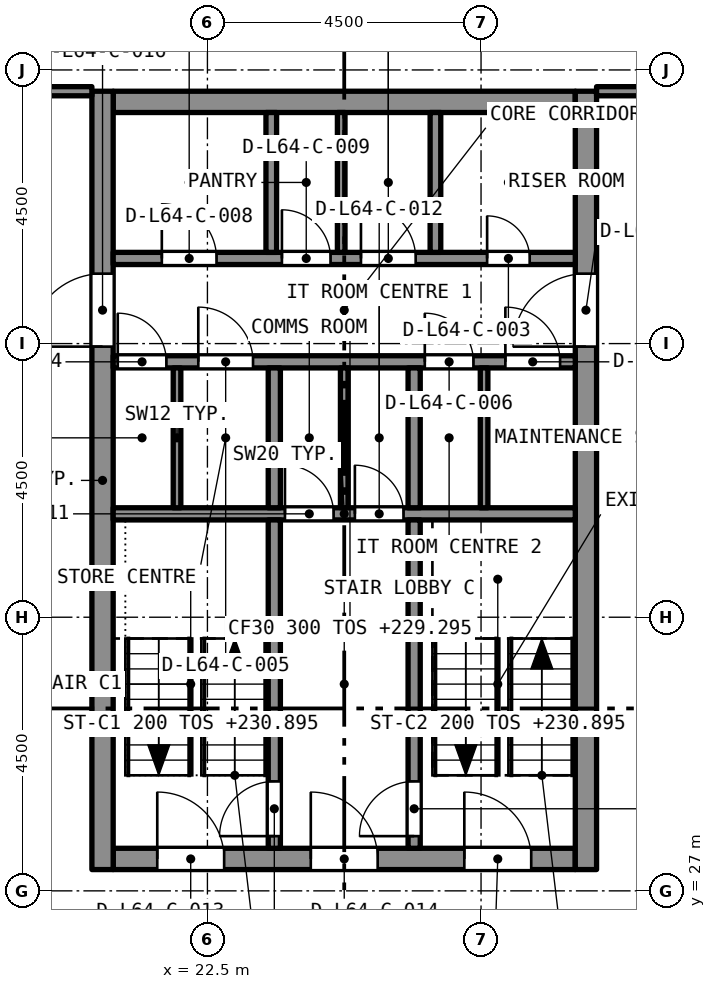
"""IFC4 building model, lengths in metres.
Left out: names, types, materials, properties, quantities, classifications, styles, units other than length and angle.
Written with IfcOpenShell. Run it as: python <this file> out.ifc"""

import sys

from ifc_helpers import new_model, si_unit, direction, frame, frame_2d, origin, place, context, subcontext, project, spatial, rectangle, extrude, element, fill, save


model = new_model("IFC4")
c1 = context("Model", 3, precision=1e-05, world=origin(), true_north=direction((0.0, 1.0)))
c2 = subcontext(c1, "Body", "Model", "MODEL_VIEW")
j1 = project(units=[si_unit("LENGTHUNIT", "METRE"), si_unit("PLANEANGLEUNIT", "RADIAN")], contexts=[c1])
p1 = place(None, origin())
s1 = spatial("IfcSite", under=j1, at=p1, CompositionType="ELEMENT")
p2 = place(p1, origin())
s2 = spatial("IfcBuilding", under=s1, at=p2, CompositionType="ELEMENT")
p3 = place(p2, frame((0.0, 0.0, 229.295)))
s3 = spatial("IfcBuildingStorey", under=s2, at=p3, CompositionType="ELEMENT", Elevation=229.295)
p4 = place(p3, frame((20.95, 27.525, 0.0), z_axis=(0.0, 0.0, 1.0), x_axis=(1.0, 0.0, 0.0)))
e1 = element("IfcWall", 1, at=p4, inside=s3, PredefinedType="SOLIDWALL", context=c2, shape_type="SweptSolid", body=[
    extrude(rectangle(XDim=7.6, YDim=0.35, at=frame_2d((3.8, 0.0))), origin(), (0.0, 0.0, 1.0), 3.2),
])
p5 = place(p4, frame((0.725, 0.0, 0.0)))
e2 = element("IfcOpeningElement", 2, at=p5, cuts=e1, PredefinedType="OPENING", context=c2, shape_type="SweptSolid", body=[
    extrude(rectangle(XDim=1.1, YDim=2.1, at=frame_2d((0.55, 1.05))), frame((0.0, 0.185, 0.0), z_axis=(0.0, -1.0, 0.0), x_axis=(1.0, 0.0, 0.0)), (0.0, 0.0, 1.0), 0.37),
])
p6 = place(p4, frame((3.25, 0.0, 0.0)))
e3 = element("IfcOpeningElement", 3, at=p6, cuts=e1, PredefinedType="OPENING", context=c2, shape_type="SweptSolid", body=[
    extrude(rectangle(XDim=1.1, YDim=2.1, at=frame_2d((0.55, 1.05))), frame((0.0, 0.185, 0.0), z_axis=(0.0, -1.0, 0.0), x_axis=(1.0, 0.0, 0.0)), (0.0, 0.0, 1.0), 0.37),
])
p7 = place(p4, frame((5.775, 0.0, 0.0)))
e4 = element("IfcOpeningElement", 4, at=p7, cuts=e1, PredefinedType="OPENING", context=c2, shape_type="SweptSolid", body=[
    extrude(rectangle(XDim=1.1, YDim=2.1, at=frame_2d((0.55, 1.05))), frame((0.0, 0.185, 0.0), z_axis=(0.0, -1.0, 0.0), x_axis=(1.0, 0.0, 0.0)), (0.0, 0.0, 1.0), 0.37),
])
p8 = place(p3, frame((20.95, 39.975, 0.0), z_axis=(0.0, 0.0, 1.0), x_axis=(1.0, 0.0, 0.0)))
e5 = element("IfcWall", 5, at=p8, inside=s3, PredefinedType="SOLIDWALL", context=c2, shape_type="SweptSolid", body=[
    extrude(rectangle(XDim=7.6, YDim=0.35, at=frame_2d((3.8, 0.0))), origin(), (0.0, 0.0, 1.0), 3.2),
])
p9 = place(p3, frame((20.775, 27.35, 0.0), z_axis=(0.0, 0.0, 1.0), x_axis=(0.0, 1.0, 0.0)))
e6 = element("IfcWall", 6, at=p9, inside=s3, PredefinedType="SOLIDWALL", context=c2, shape_type="SweptSolid", body=[
    extrude(rectangle(XDim=12.8, YDim=0.35, at=frame_2d((6.4, 0.0))), origin(), (0.0, 0.0, 1.0), 3.2),
])
p10 = place(p9, frame((8.6, 0.0, 0.0)))
e7 = element("IfcOpeningElement", 7, at=p10, cuts=e6, PredefinedType="OPENING", context=c2, shape_type="SweptSolid", body=[
    extrude(rectangle(XDim=1.2, YDim=2.1, at=frame_2d((0.6, 1.05))), frame((0.0, 0.185, 0.0), z_axis=(0.0, -1.0, 0.0), x_axis=(1.0, 0.0, 0.0)), (0.0, 0.0, 1.0), 0.37),
])
p11 = place(p3, frame((28.725, 27.35, 0.0), z_axis=(0.0, 0.0, 1.0), x_axis=(0.0, 1.0, 0.0)))
e8 = element("IfcWall", 8, at=p11, inside=s3, PredefinedType="SOLIDWALL", context=c2, shape_type="SweptSolid", body=[
    extrude(rectangle(XDim=12.8, YDim=0.35, at=frame_2d((6.4, 0.0))), origin(), (0.0, 0.0, 1.0), 3.2),
])
p12 = place(p11, frame((8.6, 0.0, 0.0)))
e9 = element("IfcOpeningElement", 9, at=p12, cuts=e8, PredefinedType="OPENING", context=c2, shape_type="SweptSolid", body=[
    extrude(rectangle(XDim=1.2, YDim=2.1, at=frame_2d((0.6, 1.05))), frame((0.0, 0.185, 0.0), z_axis=(0.0, -1.0, 0.0), x_axis=(1.0, 0.0, 0.0)), (0.0, 0.0, 1.0), 0.37),
])
p13 = place(p3, frame((18.4, 40.15, 0.0), z_axis=(0.0, 0.0, 1.0), x_axis=(1.0, 0.0, 0.0)))
e10 = element("IfcWall", 10, at=p13, inside=s3, PredefinedType="PARTITIONING", context=c2, shape_type="SweptSolid", body=[
    extrude(rectangle(XDim=2.2, YDim=0.15, at=frame_2d((1.1, 0.0))), origin(), (0.0, 0.0, 1.0), 2.75),
])
p14 = place(p13, frame((0.2, 0.0, 0.0)))
e11 = element("IfcOpeningElement", 11, at=p14, cuts=e10, PredefinedType="OPENING", context=c2, shape_type="SweptSolid", body=[
    extrude(rectangle(XDim=1.0, YDim=2.1, at=frame_2d((0.5, 1.05))), frame((0.0, 0.085, 0.0), z_axis=(0.0, -1.0, 0.0), x_axis=(1.0, 0.0, 0.0)), (0.0, 0.0, 1.0), 0.17),
])
p15 = place(p3, frame((28.9, 40.15, 0.0), z_axis=(0.0, 0.0, 1.0), x_axis=(1.0, 0.0, 0.0)))
e12 = element("IfcWall", 12, at=p15, inside=s3, PredefinedType="PARTITIONING", context=c2, shape_type="SweptSolid", body=[
    extrude(rectangle(XDim=2.2, YDim=0.15, at=frame_2d((1.1, 0.0))), origin(), (0.0, 0.0, 1.0), 2.75),
])
p16 = place(p3, frame((20.95, 33.2, 0.0), z_axis=(0.0, 0.0, 1.0), x_axis=(1.0, 0.0, 0.0)))
e13 = element("IfcWall", 13, at=p16, inside=s3, PredefinedType="SOLIDWALL", context=c2, shape_type="SweptSolid", body=[
    extrude(rectangle(XDim=7.6, YDim=0.2, at=frame_2d((3.8, 0.0))), origin(), (0.0, 0.0, 1.0), 2.9),
])
p17 = place(p16, frame((2.825, 0.0, 0.0)))
e14 = element("IfcOpeningElement", 14, at=p17, cuts=e13, PredefinedType="OPENING", context=c2, shape_type="SweptSolid", body=[
    extrude(rectangle(XDim=0.8, YDim=2.1, at=frame_2d((0.4, 1.05))), frame((0.0, 0.11, 0.0), z_axis=(0.0, -1.0, 0.0), x_axis=(1.0, 0.0, 0.0)), (0.0, 0.0, 1.0), 0.22),
])
p18 = place(p16, frame((3.975, 0.0, 0.0)))
e15 = element("IfcOpeningElement", 15, at=p18, cuts=e13, PredefinedType="OPENING", context=c2, shape_type="SweptSolid", body=[
    extrude(rectangle(XDim=0.8, YDim=2.1, at=frame_2d((0.4, 1.05))), frame((0.0, 0.11, 0.0), z_axis=(0.0, -1.0, 0.0), x_axis=(1.0, 0.0, 0.0)), (0.0, 0.0, 1.0), 0.22),
])
p19 = place(p3, frame((20.95, 35.7, 0.0), z_axis=(0.0, 0.0, 1.0), x_axis=(1.0, 0.0, 0.0)))
e16 = element("IfcWall", 16, at=p19, inside=s3, PredefinedType="SOLIDWALL", context=c2, shape_type="SweptSolid", body=[
    extrude(rectangle(XDim=7.6, YDim=0.2, at=frame_2d((3.8, 0.0))), origin(), (0.0, 0.0, 1.0), 2.9),
])
p20 = place(p19, frame((0.075, 0.0, 0.0)))
e17 = element("IfcOpeningElement", 17, at=p20, cuts=e16, PredefinedType="OPENING", context=c2, shape_type="SweptSolid", body=[
    extrude(rectangle(XDim=0.8, YDim=2.1, at=frame_2d((0.4, 1.05))), frame((0.0, 0.11, 0.0), z_axis=(0.0, -1.0, 0.0), x_axis=(1.0, 0.0, 0.0)), (0.0, 0.0, 1.0), 0.22),
])
p21 = place(p19, frame((1.4, 0.0, 0.0)))
e18 = element("IfcOpeningElement", 18, at=p21, cuts=e16, PredefinedType="OPENING", context=c2, shape_type="SweptSolid", body=[
    extrude(rectangle(XDim=0.9, YDim=2.1, at=frame_2d((0.45, 1.05))), frame((0.0, 0.11, 0.0), z_axis=(0.0, -1.0, 0.0), x_axis=(1.0, 0.0, 0.0)), (0.0, 0.0, 1.0), 0.22),
])
p22 = place(p19, frame((5.125, 0.0, 0.0)))
e19 = element("IfcOpeningElement", 19, at=p22, cuts=e16, PredefinedType="OPENING", context=c2, shape_type="SweptSolid", body=[
    extrude(rectangle(XDim=0.8, YDim=2.1, at=frame_2d((0.4, 1.05))), frame((0.0, 0.11, 0.0), z_axis=(0.0, -1.0, 0.0), x_axis=(1.0, 0.0, 0.0)), (0.0, 0.0, 1.0), 0.22),
])
p23 = place(p19, frame((6.45, 0.0, 0.0)))
e20 = element("IfcOpeningElement", 20, at=p23, cuts=e16, PredefinedType="OPENING", context=c2, shape_type="SweptSolid", body=[
    extrude(rectangle(XDim=0.9, YDim=2.1, at=frame_2d((0.45, 1.05))), frame((0.0, 0.11, 0.0), z_axis=(0.0, -1.0, 0.0), x_axis=(1.0, 0.0, 0.0)), (0.0, 0.0, 1.0), 0.22),
])
p24 = place(p3, frame((20.95, 37.4, 0.0), z_axis=(0.0, 0.0, 1.0), x_axis=(1.0, 0.0, 0.0)))
e21 = element("IfcWall", 21, at=p24, inside=s3, PredefinedType="SOLIDWALL", context=c2, shape_type="SweptSolid", body=[
    extrude(rectangle(XDim=7.6, YDim=0.2, at=frame_2d((3.8, 0.0))), origin(), (0.0, 0.0, 1.0), 2.9),
])
p25 = place(p24, frame((6.15, 0.0, 0.0)))
e22 = element("IfcOpeningElement", 22, at=p25, cuts=e21, PredefinedType="OPENING", context=c2, shape_type="SweptSolid", body=[
    extrude(rectangle(XDim=0.7, YDim=2.1, at=frame_2d((0.35, 1.05))), frame((0.0, 0.11, 0.0), z_axis=(0.0, -1.0, 0.0), x_axis=(1.0, 0.0, 0.0)), (0.0, 0.0, 1.0), 0.22),
])
p26 = place(p24, frame((0.8, 0.0, 0.0)))
e23 = element("IfcOpeningElement", 23, at=p26, cuts=e21, PredefinedType="OPENING", context=c2, shape_type="SweptSolid", body=[
    extrude(rectangle(XDim=0.9, YDim=2.1, at=frame_2d((0.45, 1.05))), frame((0.0, 0.11, 0.0), z_axis=(0.0, -1.0, 0.0), x_axis=(1.0, 0.0, 0.0)), (0.0, 0.0, 1.0), 0.22),
])
p27 = place(p24, frame((2.775, 0.0, 0.0)))
e24 = element("IfcOpeningElement", 24, at=p27, cuts=e21, PredefinedType="OPENING", context=c2, shape_type="SweptSolid", body=[
    extrude(rectangle(XDim=0.8, YDim=2.1, at=frame_2d((0.4, 1.05))), frame((0.0, 0.11, 0.0), z_axis=(0.0, -1.0, 0.0), x_axis=(1.0, 0.0, 0.0)), (0.0, 0.0, 1.0), 0.22),
])
p28 = place(p24, frame((4.075, 0.0, 0.0)))
e25 = element("IfcOpeningElement", 25, at=p28, cuts=e21, PredefinedType="OPENING", context=c2, shape_type="SweptSolid", body=[
    extrude(rectangle(XDim=0.9, YDim=2.1, at=frame_2d((0.45, 1.05))), frame((0.0, 0.11, 0.0), z_axis=(0.0, -1.0, 0.0), x_axis=(1.0, 0.0, 0.0)), (0.0, 0.0, 1.0), 0.22),
])
p29 = place(p3, frame((23.6, 27.7, 0.0), z_axis=(0.0, 0.0, 1.0), x_axis=(0.0, 1.0, 0.0)))
e26 = element("IfcWall", 26, at=p29, inside=s3, PredefinedType="SOLIDWALL", context=c2, shape_type="SweptSolid", body=[
    extrude(rectangle(XDim=5.4, YDim=0.2, at=frame_2d((2.7, 0.0))), origin(), (0.0, 0.0, 1.0), 2.9),
])
p30 = place(p29, frame((0.2, 0.0, 0.0)))
e27 = element("IfcOpeningElement", 27, at=p30, cuts=e26, PredefinedType="OPENING", context=c2, shape_type="SweptSolid", body=[
    extrude(rectangle(XDim=0.9, YDim=2.1, at=frame_2d((0.45, 1.05))), frame((0.0, 0.11, 0.0), z_axis=(0.0, -1.0, 0.0), x_axis=(1.0, 0.0, 0.0)), (0.0, 0.0, 1.0), 0.22),
])
p31 = place(p3, frame((25.9, 27.7, 0.0), z_axis=(0.0, 0.0, 1.0), x_axis=(0.0, 1.0, 0.0)))
e28 = element("IfcWall", 28, at=p31, inside=s3, PredefinedType="SOLIDWALL", context=c2, shape_type="SweptSolid", body=[
    extrude(rectangle(XDim=5.4, YDim=0.2, at=frame_2d((2.7, 0.0))), origin(), (0.0, 0.0, 1.0), 2.9),
])
p32 = place(p31, frame((0.2, 0.0, 0.0)))
e29 = element("IfcOpeningElement", 29, at=p32, cuts=e28, PredefinedType="OPENING", context=c2, shape_type="SweptSolid", body=[
    extrude(rectangle(XDim=0.9, YDim=2.1, at=frame_2d((0.45, 1.05))), frame((0.0, 0.11, 0.0), z_axis=(0.0, -1.0, 0.0), x_axis=(1.0, 0.0, 0.0)), (0.0, 0.0, 1.0), 0.22),
])
for number, where, z_axis, x_axis in (
    (30, (23.6, 33.3, 0.0), (0.0, 0.0, 1.0), (0.0, 1.0, 0.0)),
    (31, (25.9, 33.3, 0.0), (0.0, 0.0, 1.0), (0.0, 1.0, 0.0)),
):
    element("IfcWall", number, at=place(p3, frame(where, z_axis=z_axis, x_axis=x_axis)), inside=s3, PredefinedType="SOLIDWALL", context=c2, shape_type="SweptSolid", body=[
        extrude(rectangle(XDim=2.3, YDim=0.2, at=frame_2d((1.15, 0.0))), origin(), (0.0, 0.0, 1.0), 2.9),
    ])
for number, where, z_axis, x_axis in (
    (32, (23.55, 37.5, 0.0), (0.0, 0.0, 1.0), (0.0, 1.0, 0.0)),
    (33, (26.25, 37.5, 0.0), (0.0, 0.0, 1.0), (0.0, 1.0, 0.0)),
):
    element("IfcWall", number, at=place(p3, frame(where, z_axis=z_axis, x_axis=x_axis)), inside=s3, PredefinedType="SOLIDWALL", context=c2, shape_type="SweptSolid", body=[
        extrude(rectangle(XDim=2.3, YDim=0.175, at=frame_2d((1.15, 0.0))), origin(), (0.0, 0.0, 1.0), 2.9),
    ])
for number, where, z_axis, x_axis in (
    (34, (22.0, 33.3, 0.0), (0.0, 0.0, 1.0), (0.0, 1.0, 0.0)),
    (35, (27.05, 33.3, 0.0), (0.0, 0.0, 1.0), (0.0, 1.0, 0.0)),
    (36, (24.7, 37.5, 0.0), (0.0, 0.0, 1.0), (0.0, 1.0, 0.0)),
    (37, (24.75, 33.3, 0.0), (0.0, 0.0, 1.0), (0.0, 1.0, 0.0)),
):
    element("IfcWall", number, at=place(p3, frame(where, z_axis=z_axis, x_axis=x_axis)), inside=s3, PredefinedType="PARTITIONING", context=c2, shape_type="SweptSolid", body=[
        extrude(rectangle(XDim=2.3, YDim=0.125, at=frame_2d((1.15, 0.0))), origin(), (0.0, 0.0, 1.0), 2.9),
    ])
p33 = place(p30, origin())
e38 = element("IfcDoor", 38, at=p33, inside=s3, OperationType="SINGLE_SWING_LEFT", PredefinedType="DOOR", context=c2, shape_type="SweptSolid", body=[
    extrude(rectangle(XDim=0.9, YDim=2.1, at=frame_2d((0.45, 1.05))), frame((0.0, 0.025, 0.0), z_axis=(0.0, -1.0, 0.0), x_axis=(1.0, 0.0, 0.0)), (0.0, 0.0, 1.0), 0.05),
])
fill(e27, e38)
p34 = place(p32, origin())
e39 = element("IfcDoor", 39, at=p34, inside=s3, OperationType="SINGLE_SWING_LEFT", PredefinedType="DOOR", context=c2, shape_type="SweptSolid", body=[
    extrude(rectangle(XDim=0.9, YDim=2.1, at=frame_2d((0.45, 1.05))), frame((0.0, 0.025, 0.0), z_axis=(0.0, -1.0, 0.0), x_axis=(1.0, 0.0, 0.0)), (0.0, 0.0, 1.0), 0.05),
])
fill(e29, e39)
p35 = place(p25, origin())
e40 = element("IfcDoor", 40, at=p35, inside=s3, OperationType="SINGLE_SWING_LEFT", PredefinedType="DOOR", context=c2, shape_type="SweptSolid", body=[
    extrude(rectangle(XDim=0.7, YDim=2.1, at=frame_2d((0.35, 1.05))), frame((0.0, 0.025, 0.0), z_axis=(0.0, -1.0, 0.0), x_axis=(1.0, 0.0, 0.0)), (0.0, 0.0, 1.0), 0.05),
])
fill(e22, e40)
p36 = place(p20, origin())
e41 = element("IfcDoor", 41, at=p36, inside=s3, OperationType="SINGLE_SWING_LEFT", PredefinedType="DOOR", context=c2, shape_type="SweptSolid", body=[
    extrude(rectangle(XDim=0.8, YDim=2.1, at=frame_2d((0.4, 1.05))), frame((0.0, 0.025, 0.0), z_axis=(0.0, -1.0, 0.0), x_axis=(1.0, 0.0, 0.0)), (0.0, 0.0, 1.0), 0.05),
])
fill(e17, e41)
p37 = place(p21, origin())
e42 = element("IfcDoor", 42, at=p37, inside=s3, OperationType="SINGLE_SWING_LEFT", PredefinedType="DOOR", context=c2, shape_type="SweptSolid", body=[
    extrude(rectangle(XDim=0.9, YDim=2.1, at=frame_2d((0.45, 1.05))), frame((0.0, 0.025, 0.0), z_axis=(0.0, -1.0, 0.0), x_axis=(1.0, 0.0, 0.0)), (0.0, 0.0, 1.0), 0.05),
])
fill(e18, e42)
p38 = place(p22, origin())
e43 = element("IfcDoor", 43, at=p38, inside=s3, OperationType="SINGLE_SWING_LEFT", PredefinedType="DOOR", context=c2, shape_type="SweptSolid", body=[
    extrude(rectangle(XDim=0.8, YDim=2.1, at=frame_2d((0.4, 1.05))), frame((0.0, 0.025, 0.0), z_axis=(0.0, -1.0, 0.0), x_axis=(1.0, 0.0, 0.0)), (0.0, 0.0, 1.0), 0.05),
])
fill(e19, e43)
p39 = place(p23, origin())
e44 = element("IfcDoor", 44, at=p39, inside=s3, OperationType="SINGLE_SWING_LEFT", PredefinedType="DOOR", context=c2, shape_type="SweptSolid", body=[
    extrude(rectangle(XDim=0.9, YDim=2.1, at=frame_2d((0.45, 1.05))), frame((0.0, 0.025, 0.0), z_axis=(0.0, -1.0, 0.0), x_axis=(1.0, 0.0, 0.0)), (0.0, 0.0, 1.0), 0.05),
])
fill(e20, e44)
p40 = place(p26, origin())
e45 = element("IfcDoor", 45, at=p40, inside=s3, OperationType="SINGLE_SWING_LEFT", PredefinedType="DOOR", context=c2, shape_type="SweptSolid", body=[
    extrude(rectangle(XDim=0.9, YDim=2.1, at=frame_2d((0.45, 1.05))), frame((0.0, 0.025, 0.0), z_axis=(0.0, -1.0, 0.0), x_axis=(1.0, 0.0, 0.0)), (0.0, 0.0, 1.0), 0.05),
])
fill(e23, e45)
p41 = place(p27, origin())
e46 = element("IfcDoor", 46, at=p41, inside=s3, OperationType="SINGLE_SWING_LEFT", PredefinedType="DOOR", context=c2, shape_type="SweptSolid", body=[
    extrude(rectangle(XDim=0.8, YDim=2.1, at=frame_2d((0.4, 1.05))), frame((0.0, 0.025, 0.0), z_axis=(0.0, -1.0, 0.0), x_axis=(1.0, 0.0, 0.0)), (0.0, 0.0, 1.0), 0.05),
])
fill(e24, e46)
p42 = place(p28, origin())
e47 = element("IfcDoor", 47, at=p42, inside=s3, OperationType="SINGLE_SWING_LEFT", PredefinedType="DOOR", context=c2, shape_type="SweptSolid", body=[
    extrude(rectangle(XDim=0.9, YDim=2.1, at=frame_2d((0.45, 1.05))), frame((0.0, 0.025, 0.0), z_axis=(0.0, -1.0, 0.0), x_axis=(1.0, 0.0, 0.0)), (0.0, 0.0, 1.0), 0.05),
])
fill(e25, e47)
p43 = place(p17, origin())
e48 = element("IfcDoor", 48, at=p43, inside=s3, OperationType="SINGLE_SWING_LEFT", PredefinedType="DOOR", context=c2, shape_type="SweptSolid", body=[
    extrude(rectangle(XDim=0.8, YDim=2.1, at=frame_2d((0.4, 1.05))), frame((0.0, 0.025, 0.0), z_axis=(0.0, -1.0, 0.0), x_axis=(1.0, 0.0, 0.0)), (0.0, 0.0, 1.0), 0.05),
])
fill(e14, e48)
p44 = place(p18, origin())
e49 = element("IfcDoor", 49, at=p44, inside=s3, OperationType="SINGLE_SWING_LEFT", PredefinedType="DOOR", context=c2, shape_type="SweptSolid", body=[
    extrude(rectangle(XDim=0.8, YDim=2.1, at=frame_2d((0.4, 1.05))), frame((0.0, 0.025, 0.0), z_axis=(0.0, -1.0, 0.0), x_axis=(1.0, 0.0, 0.0)), (0.0, 0.0, 1.0), 0.05),
])
fill(e15, e49)
p45 = place(p5, origin())
e50 = element("IfcDoor", 50, at=p45, inside=s3, OperationType="SINGLE_SWING_LEFT", PredefinedType="DOOR", context=c2, shape_type="SweptSolid", body=[
    extrude(rectangle(XDim=1.1, YDim=2.1, at=frame_2d((0.55, 1.05))), frame((0.0, 0.025, 0.0), z_axis=(0.0, -1.0, 0.0), x_axis=(1.0, 0.0, 0.0)), (0.0, 0.0, 1.0), 0.05),
])
fill(e2, e50)
p46 = place(p6, origin())
e51 = element("IfcDoor", 51, at=p46, inside=s3, OperationType="SINGLE_SWING_LEFT", PredefinedType="DOOR", context=c2, shape_type="SweptSolid", body=[
    extrude(rectangle(XDim=1.1, YDim=2.1, at=frame_2d((0.55, 1.05))), frame((0.0, 0.025, 0.0), z_axis=(0.0, -1.0, 0.0), x_axis=(1.0, 0.0, 0.0)), (0.0, 0.0, 1.0), 0.05),
])
fill(e3, e51)
p47 = place(p7, origin())
e52 = element("IfcDoor", 52, at=p47, inside=s3, OperationType="SINGLE_SWING_LEFT", PredefinedType="DOOR", context=c2, shape_type="SweptSolid", body=[
    extrude(rectangle(XDim=1.1, YDim=2.1, at=frame_2d((0.55, 1.05))), frame((0.0, 0.025, 0.0), z_axis=(0.0, -1.0, 0.0), x_axis=(1.0, 0.0, 0.0)), (0.0, 0.0, 1.0), 0.05),
])
fill(e4, e52)
p48 = place(p10, origin())
e53 = element("IfcDoor", 53, at=p48, inside=s3, OperationType="SINGLE_SWING_LEFT", PredefinedType="DOOR", context=c2, shape_type="SweptSolid", body=[
    extrude(rectangle(XDim=1.2, YDim=2.1, at=frame_2d((0.6, 1.05))), frame((0.0, 0.025, 0.0), z_axis=(0.0, -1.0, 0.0), x_axis=(1.0, 0.0, 0.0)), (0.0, 0.0, 1.0), 0.05),
])
fill(e7, e53)
p49 = place(p12, origin())
e54 = element("IfcDoor", 54, at=p49, inside=s3, OperationType="SINGLE_SWING_LEFT", PredefinedType="DOOR", context=c2, shape_type="SweptSolid", body=[
    extrude(rectangle(XDim=1.2, YDim=2.1, at=frame_2d((0.6, 1.05))), frame((0.0, 0.025, 0.0), z_axis=(0.0, -1.0, 0.0), x_axis=(1.0, 0.0, 0.0)), (0.0, 0.0, 1.0), 0.05),
])
fill(e9, e54)
save(model, sys.argv[1])
